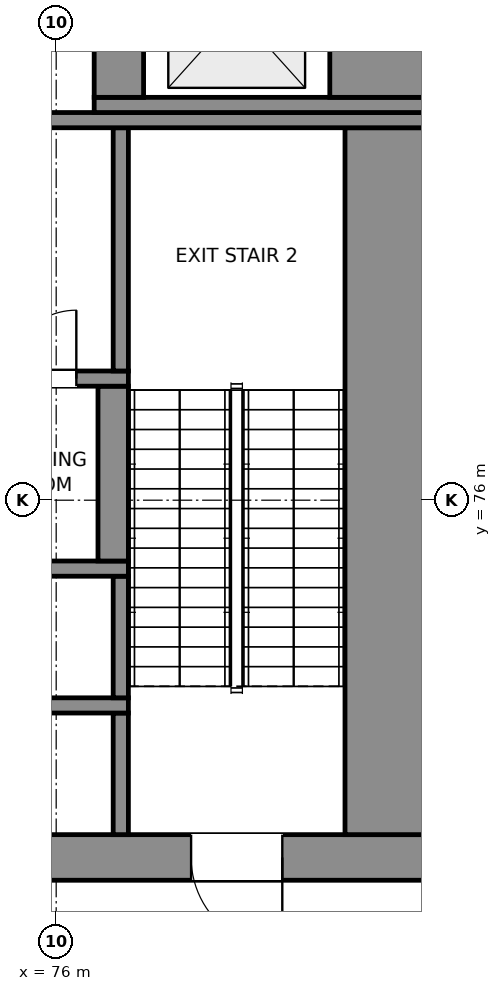
"""IFC4 building model, lengths in metres.
Left out: names, types, materials, properties, quantities, classifications, styles, units other than length and angle.
Written with IfcOpenShell. Run it as: python <this file> out.ifc"""

import sys

from ifc_helpers import new_model, si_unit, direction, frame, frame_2d, origin, place, context, subcontext, project, spatial, rectangle, extrude, element, fill, save


model = new_model("IFC4")
c1 = context("Model", 3, precision=1e-05, world=origin(), true_north=direction((0.0, 1.0)))
c2 = subcontext(c1, "Body", "Model", "MODEL_VIEW")
j1 = project(units=[si_unit("LENGTHUNIT", "METRE"), si_unit("PLANEANGLEUNIT", "RADIAN")], contexts=[c1])
p1 = place(None, origin())
s1 = spatial("IfcSite", under=j1, at=p1, CompositionType="ELEMENT")
p2 = place(p1, origin())
s2 = spatial("IfcBuilding", under=s1, at=p2, CompositionType="ELEMENT")
p3 = place(p2, frame((0.0, 0.0, 300.1)))
s3 = spatial("IfcBuildingStorey", under=s2, at=p3, CompositionType="ELEMENT", Elevation=300.1)
p4 = place(p3, frame((59.0, 71.3, 0.0), z_axis=(0.0, 0.0, 1.0), x_axis=(1.0, 0.0, 0.0)))
e1 = element("IfcWall", 1, at=p4, inside=s3, PredefinedType="SHEAR", context=c2, shape_type="SweptSolid", body=[
    extrude(rectangle(XDim=22.0, YDim=0.6, at=frame_2d((11.0, 0.0))), origin(), (0.0, 0.0, 1.0), 6.0),
])
p5 = place(p4, frame((2.025, 0.0, 0.0)))
e2 = element("IfcOpeningElement", 2, at=p5, cuts=e1, PredefinedType="OPENING", context=c2, shape_type="SweptSolid", body=[
    extrude(rectangle(XDim=1.2, YDim=2.1, at=frame_2d((0.6, 1.05))), frame((0.0, 0.31, 0.0), z_axis=(0.0, -1.0, 0.0), x_axis=(1.0, 0.0, 0.0)), (0.0, 0.0, 1.0), 0.62),
])
p6 = place(p4, frame((18.775, 0.0, 0.0)))
e3 = element("IfcOpeningElement", 3, at=p6, cuts=e1, PredefinedType="OPENING", context=c2, shape_type="SweptSolid", body=[
    extrude(rectangle(XDim=1.2, YDim=2.1, at=frame_2d((0.6, 1.05))), frame((0.0, 0.31, 0.0), z_axis=(0.0, -1.0, 0.0), x_axis=(1.0, 0.0, 0.0)), (0.0, 0.0, 1.0), 0.62),
])
p7 = place(p4, frame((10.0, 0.0, 0.0)))
e4 = element("IfcOpeningElement", 4, at=p7, cuts=e1, PredefinedType="OPENING", context=c2, shape_type="SweptSolid", body=[
    extrude(rectangle(XDim=2.0, YDim=2.1, at=frame_2d((1.0, 1.05))), frame((0.0, 0.31, 0.0), z_axis=(0.0, -1.0, 0.0), x_axis=(1.0, 0.0, 0.0)), (0.0, 0.0, 1.0), 0.62),
])
p8 = place(p3, frame((76.85, 71.6, 0.0), z_axis=(0.0, 0.0, 1.0), x_axis=(0.0, 1.0, 0.0)))
e5 = element("IfcWall", 5, at=p8, inside=s3, PredefinedType="SHEAR", context=c2, shape_type="SweptSolid", body=[
    extrude(rectangle(XDim=1.6, YDim=0.2, at=frame_2d((0.8, 0.0))), origin(), (0.0, 0.0, 1.0), 6.0),
])
p9 = place(p3, frame((80.4, 71.6, 0.0), z_axis=(0.0, 0.0, 1.0), x_axis=(0.0, 1.0, 0.0)))
e6 = element("IfcWall", 6, at=p9, inside=s3, PredefinedType="SHEAR", context=c2, shape_type="SweptSolid", body=[
    extrude(rectangle(XDim=9.3, YDim=1.2, at=frame_2d((4.65, 0.0))), origin(), (0.0, 0.0, 1.0), 6.0),
])
p10 = place(p3, frame((71.25, 73.3, 0.0), z_axis=(0.0, 0.0, 1.0), x_axis=(1.0, 0.0, 0.0)))
e7 = element("IfcWall", 7, at=p10, inside=s3, PredefinedType="SHEAR", context=c2, shape_type="SweptSolid", body=[
    extrude(rectangle(XDim=5.7, YDim=0.2, at=frame_2d((2.85, 0.0))), origin(), (0.0, 0.0, 1.0), 6.0),
])
p11 = place(p3, frame((76.85, 73.4, 0.0), z_axis=(0.0, 0.0, 1.0), x_axis=(0.0, 1.0, 0.0)))
e8 = element("IfcWall", 8, at=p11, inside=s3, PredefinedType="SHEAR", context=c2, shape_type="SweptSolid", body=[
    extrude(rectangle(XDim=1.6, YDim=0.2, at=frame_2d((0.8, 0.0))), origin(), (0.0, 0.0, 1.0), 6.0),
])
p12 = place(p3, frame((71.25, 75.1, 0.0), z_axis=(0.0, 0.0, 1.0), x_axis=(1.0, 0.0, 0.0)))
e9 = element("IfcWall", 9, at=p12, inside=s3, PredefinedType="SHEAR", context=c2, shape_type="SweptSolid", body=[
    extrude(rectangle(XDim=5.7, YDim=0.2, at=frame_2d((2.85, 0.0))), origin(), (0.0, 0.0, 1.0), 6.0),
])
p13 = place(p3, frame((76.75, 75.2, 0.0), z_axis=(0.0, 0.0, 1.0), x_axis=(0.0, 1.0, 0.0)))
e10 = element("IfcWall", 10, at=p13, inside=s3, PredefinedType="SHEAR", context=c2, shape_type="SweptSolid", body=[
    extrude(rectangle(XDim=2.3, YDim=0.4, at=frame_2d((1.15, 0.0))), origin(), (0.0, 0.0, 1.0), 6.0),
])
p14 = place(p3, frame((71.25, 77.6, 0.0), z_axis=(0.0, 0.0, 1.0), x_axis=(1.0, 0.0, 0.0)))
e11 = element("IfcWall", 11, at=p14, inside=s3, PredefinedType="SHEAR", context=c2, shape_type="SweptSolid", body=[
    extrude(rectangle(XDim=5.7, YDim=0.2, at=frame_2d((2.85, 0.0))), origin(), (0.0, 0.0, 1.0), 6.0),
])
p15 = place(p14, frame((1.465, 0.0, 0.0)))
e12 = element("IfcOpeningElement", 12, at=p15, cuts=e11, PredefinedType="OPENING", context=c2, shape_type="SweptSolid", body=[
    extrude(rectangle(XDim=0.9, YDim=2.1, at=frame_2d((0.45, 1.05))), frame((0.0, 0.11, 0.0), z_axis=(0.0, -1.0, 0.0), x_axis=(1.0, 0.0, 0.0)), (0.0, 0.0, 1.0), 0.22),
])
p16 = place(p14, frame((4.115, 0.0, 0.0)))
e13 = element("IfcOpeningElement", 13, at=p16, cuts=e11, PredefinedType="OPENING", context=c2, shape_type="SweptSolid", body=[
    extrude(rectangle(XDim=0.9, YDim=2.1, at=frame_2d((0.45, 1.05))), frame((0.0, 0.11, 0.0), z_axis=(0.0, -1.0, 0.0), x_axis=(1.0, 0.0, 0.0)), (0.0, 0.0, 1.0), 0.22),
])
p17 = place(p3, frame((76.85, 77.7, 0.0), z_axis=(0.0, 0.0, 1.0), x_axis=(0.0, 1.0, 0.0)))
e14 = element("IfcWall", 14, at=p17, inside=s3, PredefinedType="SHEAR", context=c2, shape_type="SweptSolid", body=[
    extrude(rectangle(XDim=3.2, YDim=0.2, at=frame_2d((1.6, 0.0))), origin(), (0.0, 0.0, 1.0), 6.0),
])
p18 = place(p3, frame((59.0, 81.0, 0.0), z_axis=(0.0, 0.0, 1.0), x_axis=(1.0, 0.0, 0.0)))
e15 = element("IfcWall", 15, at=p18, inside=s3, PredefinedType="SHEAR", context=c2, shape_type="SweptSolid", body=[
    extrude(rectangle(XDim=22.0, YDim=0.2, at=frame_2d((11.0, 0.0))), origin(), (0.0, 0.0, 1.0), 6.0),
])
p19 = place(p18, frame((10.035, 0.0, 0.0)))
e16 = element("IfcOpeningElement", 16, at=p19, cuts=e15, PredefinedType="OPENING", context=c2, shape_type="SweptSolid", body=[
    extrude(rectangle(XDim=0.9, YDim=2.1, at=frame_2d((0.45, 1.05))), frame((0.0, 0.11, 0.0), z_axis=(0.0, -1.0, 0.0), x_axis=(1.0, 0.0, 0.0)), (0.0, 0.0, 1.0), 0.22),
])
p20 = place(p18, frame((12.685, 0.0, 0.0)))
e17 = element("IfcOpeningElement", 17, at=p20, cuts=e15, PredefinedType="OPENING", context=c2, shape_type="SweptSolid", body=[
    extrude(rectangle(XDim=0.9, YDim=2.1, at=frame_2d((0.45, 1.05))), frame((0.0, 0.11, 0.0), z_axis=(0.0, -1.0, 0.0), x_axis=(1.0, 0.0, 0.0)), (0.0, 0.0, 1.0), 0.22),
])
p21 = place(p3, frame((76.5, 81.2, 0.0), z_axis=(0.0, 0.0, 1.0), x_axis=(1.0, 0.0, 0.0)))
e18 = element("IfcWall", 18, at=p21, inside=s3, PredefinedType="SHEAR", context=c2, shape_type="SweptSolid", body=[
    extrude(rectangle(XDim=4.5, YDim=0.2, at=frame_2d((2.25, 0.0))), origin(), (0.0, 0.0, 1.0), 6.0),
])
p22 = place(p3, frame((76.825, 81.3, 0.0), z_axis=(0.0, 0.0, 1.0), x_axis=(0.0, 1.0, 0.0)))
e19 = element("IfcWall", 19, at=p22, inside=s3, PredefinedType="SHEAR", context=c2, shape_type="SweptSolid", body=[
    extrude(rectangle(XDim=2.25, YDim=0.65, at=frame_2d((1.125, 0.0))), origin(), (0.0, 0.0, 1.0), 6.0),
])
p23 = place(p3, frame((80.3, 81.3, 0.0), z_axis=(0.0, 0.0, 1.0), x_axis=(0.0, 1.0, 0.0)))
e20 = element("IfcWall", 20, at=p23, inside=s3, PredefinedType="SHEAR", context=c2, shape_type="SweptSolid", body=[
    extrude(rectangle(XDim=2.25, YDim=1.4, at=frame_2d((1.125, 0.0))), origin(), (0.0, 0.0, 1.0), 6.0),
])
p24 = place(p6, frame((1.2, 0.0, 0.0), z_axis=(0.0, 0.0, 1.0), x_axis=(-1.0, 0.0, 0.0)))
e21 = element("IfcDoor", 21, at=p24, inside=s3, OperationType="SINGLE_SWING_LEFT", PredefinedType="DOOR", context=c2, shape_type="SweptSolid", body=[
    extrude(rectangle(XDim=1.2, YDim=2.1, at=frame_2d((0.6, 1.05))), frame((0.0, 0.025, 0.0), z_axis=(0.0, -1.0, 0.0), x_axis=(1.0, 0.0, 0.0)), (0.0, 0.0, 1.0), 0.05),
])
fill(e3, e21)
p25 = place(p16, origin())
e22 = element("IfcDoor", 22, at=p25, inside=s3, OperationType="SINGLE_SWING_RIGHT", PredefinedType="DOOR", context=c2, shape_type="SweptSolid", body=[
    extrude(rectangle(XDim=0.9, YDim=2.1, at=frame_2d((0.45, 1.05))), frame((0.0, 0.025, 0.0), z_axis=(0.0, -1.0, 0.0), x_axis=(1.0, 0.0, 0.0)), (0.0, 0.0, 1.0), 0.05),
])
fill(e13, e22)
save(model, sys.argv[1])
